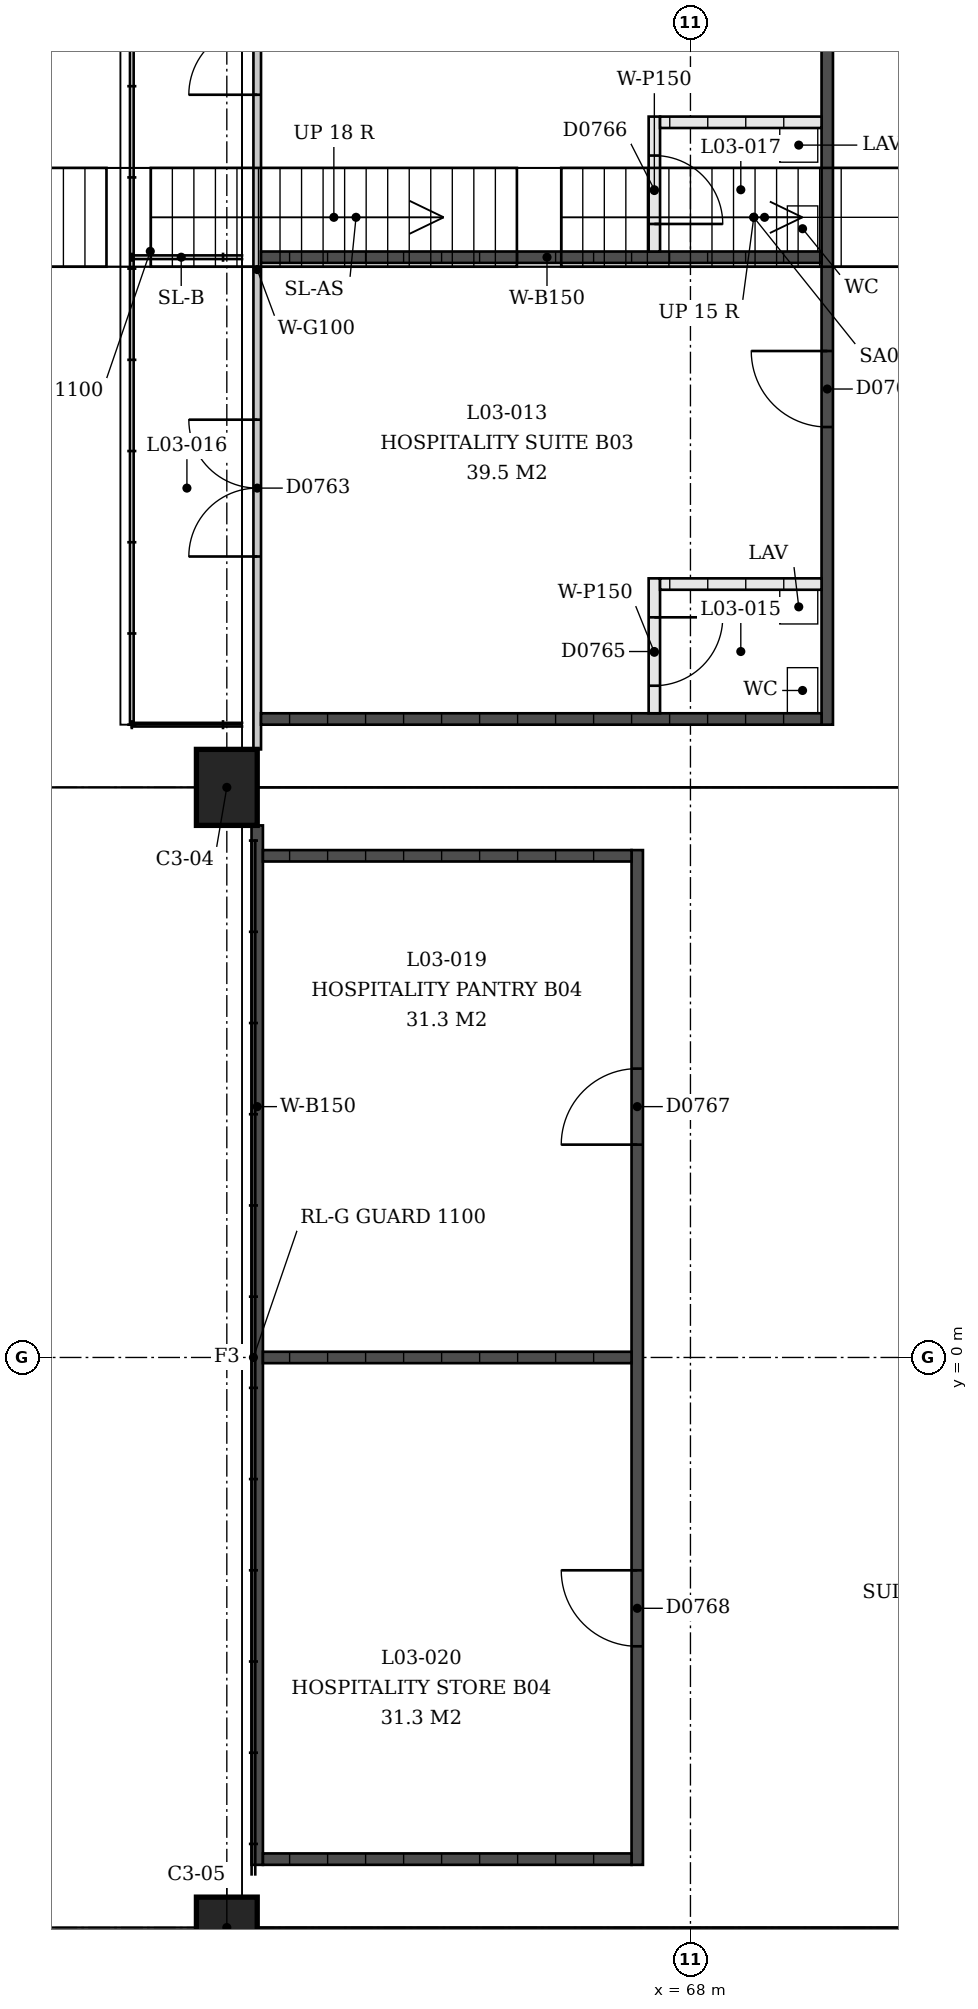
"""IFC4 building model, lengths in metres.
Left out: names, types, materials, properties, quantities, classifications, styles, units other than length and angle.
Written with IfcOpenShell. Run it as: python <this file> out.ifc"""

import sys

from ifc_helpers import new_model, si_unit, direction, frame, frame_2d, origin, origin_2d, place, context, subcontext, project, spatial, rectangle, extrude, element, fill, save


model = new_model("IFC4")
c1 = context("Model", 3, precision=1e-05, world=origin(), true_north=direction((0.0, 1.0)))
c2 = subcontext(c1, "Body", "Model", "MODEL_VIEW")
j1 = project(units=[si_unit("LENGTHUNIT", "METRE"), si_unit("PLANEANGLEUNIT", "RADIAN")], contexts=[c1])
p1 = place(None, origin())
s1 = spatial("IfcSite", under=j1, at=p1, CompositionType="ELEMENT")
p2 = place(p1, origin())
s2 = spatial("IfcBuilding", under=s1, at=p2, CompositionType="ELEMENT")
p3 = place(p2, frame((0.0, 0.0, 13.5)))
s3 = spatial("IfcBuildingStorey", under=s2, at=p3, CompositionType="ELEMENT", Elevation=13.5)
p4 = place(p3, frame((61.9, 7.5, 0.0), z_axis=(0.0, 0.0, 1.0), x_axis=(0.0, 1.0, 0.0)))
e1 = element("IfcColumn", 1, at=p4, inside=s3, PredefinedType="COLUMN", context=c2, shape_type="SweptSolid", body=[
    extrude(rectangle(XDim=1.0, YDim=0.8, at=origin_2d()), origin(), (0.0, 0.0, 1.0), 2.033),
])
p5 = place(p3, frame((61.9, -7.5, 0.0), z_axis=(0.0, 0.0, 1.0), x_axis=(0.0, 1.0, 0.0)))
e2 = element("IfcColumn", 2, at=p5, inside=s3, PredefinedType="COLUMN", context=c2, shape_type="SweptSolid", body=[
    extrude(rectangle(XDim=0.8, YDim=0.8, at=origin_2d()), origin(), (0.0, 0.0, 1.0), 2.033),
])
p6 = place(p3, frame((62.3, 8.0, 0.0), z_axis=(0.0, 0.0, 1.0), x_axis=(0.0, 1.0, 0.0)))
e3 = element("IfcWall", 3, at=p6, inside=s3, PredefinedType="PARTITIONING", context=c2, shape_type="SweptSolid", body=[
    extrude(rectangle(XDim=12.625, YDim=0.1, at=frame_2d((6.312, 0.0))), origin(), (0.0, 0.0, 1.0), 3.0),
])
p7 = place(p6, frame((2.538, 0.0, 0.0)))
e4 = element("IfcOpeningElement", 4, at=p7, cuts=e3, PredefinedType="OPENING", context=c2, shape_type="SweptSolid", body=[
    extrude(rectangle(XDim=1.8, YDim=2.1, at=frame_2d((0.9, 1.05))), frame((0.0, 0.05, 0.0), z_axis=(0.0, -1.0, 0.0), x_axis=(1.0, 0.0, 0.0)), (0.0, 0.0, 1.0), 0.1),
])
p8 = place(p6, frame((8.613, 0.0, 0.0)))
e5 = element("IfcOpeningElement", 5, at=p8, cuts=e3, PredefinedType="OPENING", context=c2, shape_type="SweptSolid", body=[
    extrude(rectangle(XDim=1.8, YDim=2.1, at=frame_2d((0.9, 1.05))), frame((0.0, 0.05, 0.0), z_axis=(0.0, -1.0, 0.0), x_axis=(1.0, 0.0, 0.0)), (0.0, 0.0, 1.0), 0.1),
])
p9 = place(p3, frame((69.8, 8.325, 0.0), z_axis=(0.0, 0.0, 1.0), x_axis=(0.0, 1.0, 0.0)))
e6 = element("IfcWall", 6, at=p9, inside=s3, PredefinedType="SOLIDWALL", context=c2, shape_type="SweptSolid", body=[
    extrude(rectangle(XDim=12.3, YDim=0.15, at=frame_2d((6.15, 0.0))), origin(), (0.0, 0.0, 1.0), 3.0),
])
p10 = place(p9, frame((3.916, 0.0, 0.0)))
e7 = element("IfcOpeningElement", 7, at=p10, cuts=e6, PredefinedType="OPENING", context=c2, shape_type="SweptSolid", body=[
    extrude(rectangle(XDim=1.0, YDim=2.1, at=frame_2d((0.5, 1.05))), frame((0.0, 0.075, 0.0), z_axis=(0.0, -1.0, 0.0), x_axis=(1.0, 0.0, 0.0)), (0.0, 0.0, 1.0), 0.15),
])
p11 = place(p9, frame((9.991, 0.0, 0.0)))
e8 = element("IfcOpeningElement", 8, at=p11, cuts=e6, PredefinedType="OPENING", context=c2, shape_type="SweptSolid", body=[
    extrude(rectangle(XDim=1.0, YDim=2.1, at=frame_2d((0.5, 1.05))), frame((0.0, 0.075, 0.0), z_axis=(0.0, -1.0, 0.0), x_axis=(1.0, 0.0, 0.0)), (0.0, 0.0, 1.0), 0.15),
])
for number, where, z_axis, x_axis in (
    (9, (62.35, 8.4, 0.0), (0.0, 0.0, 1.0), (1.0, 0.0, 0.0)),
    (10, (62.35, 14.475, 0.0), (0.0, 0.0, 1.0), (1.0, 0.0, 0.0)),
):
    element("IfcWall", number, at=place(p3, frame(where, z_axis=z_axis, x_axis=x_axis)), inside=s3, PredefinedType="SOLIDWALL", context=c2, shape_type="SweptSolid", body=[
        extrude(rectangle(XDim=7.375, YDim=0.15, at=frame_2d((3.688, 0.0))), origin(), (0.0, 0.0, 1.0), 3.0),
    ])
p12 = place(p3, frame((67.525, 8.475, 0.0), z_axis=(0.0, 0.0, 1.0), x_axis=(0.0, 1.0, 0.0)))
e11 = element("IfcWall", 11, at=p12, inside=s3, PredefinedType="PARTITIONING", context=c2, shape_type="SweptSolid", body=[
    extrude(rectangle(XDim=1.775, YDim=0.15, at=frame_2d((0.887, 0.0))), origin(), (0.0, 0.0, 1.0), 3.0),
])
p13 = place(p12, frame((0.363, 0.0, 0.0)))
e12 = element("IfcOpeningElement", 12, at=p13, cuts=e11, PredefinedType="OPENING", context=c2, shape_type="SweptSolid", body=[
    extrude(rectangle(XDim=0.9, YDim=2.1, at=frame_2d((0.45, 1.05))), frame((0.0, 0.075, 0.0), z_axis=(0.0, -1.0, 0.0), x_axis=(1.0, 0.0, 0.0)), (0.0, 0.0, 1.0), 0.15),
])
p14 = place(p3, frame((67.6, 10.175, 0.0), z_axis=(0.0, 0.0, 1.0), x_axis=(1.0, 0.0, 0.0)))
e13 = element("IfcWall", 13, at=p14, inside=s3, PredefinedType="PARTITIONING", context=c2, shape_type="SweptSolid", body=[
    extrude(rectangle(XDim=2.125, YDim=0.15, at=frame_2d((1.062, 0.0))), origin(), (0.0, 0.0, 1.0), 3.0),
])
p15 = place(p3, frame((67.525, 14.55, 0.0), z_axis=(0.0, 0.0, 1.0), x_axis=(0.0, 1.0, 0.0)))
e14 = element("IfcWall", 14, at=p15, inside=s3, PredefinedType="PARTITIONING", context=c2, shape_type="SweptSolid", body=[
    extrude(rectangle(XDim=1.775, YDim=0.15, at=frame_2d((0.887, 0.0))), origin(), (0.0, 0.0, 1.0), 3.0),
])
p16 = place(p15, frame((0.363, 0.0, 0.0)))
e15 = element("IfcOpeningElement", 15, at=p16, cuts=e14, PredefinedType="OPENING", context=c2, shape_type="SweptSolid", body=[
    extrude(rectangle(XDim=0.9, YDim=2.1, at=frame_2d((0.45, 1.05))), frame((0.0, 0.075, 0.0), z_axis=(0.0, -1.0, 0.0), x_axis=(1.0, 0.0, 0.0)), (0.0, 0.0, 1.0), 0.15),
])
p17 = place(p3, frame((67.6, 16.25, 0.0), z_axis=(0.0, 0.0, 1.0), x_axis=(1.0, 0.0, 0.0)))
e16 = element("IfcWall", 16, at=p17, inside=s3, PredefinedType="PARTITIONING", context=c2, shape_type="SweptSolid", body=[
    extrude(rectangle(XDim=2.125, YDim=0.15, at=frame_2d((1.062, 0.0))), origin(), (0.0, 0.0, 1.0), 3.0),
])
p18 = place(p3, frame((62.3, 7.0, 0.0), z_axis=(0.0, 0.0, 1.0), x_axis=(0.0, -1.0, 0.0)))
e17 = element("IfcWall", 17, at=p18, inside=s3, PredefinedType="SOLIDWALL", context=c2, shape_type="SweptSolid", body=[
    extrude(rectangle(XDim=13.675, YDim=0.15, at=frame_2d((6.837, 0.0))), origin(), (0.0, 0.0, 1.0), 3.0),
])
p19 = place(p3, frame((67.3, 6.675, 0.0), z_axis=(0.0, 0.0, 1.0), x_axis=(0.0, -1.0, 0.0)))
e18 = element("IfcWall", 18, at=p19, inside=s3, PredefinedType="SOLIDWALL", context=c2, shape_type="SweptSolid", body=[
    extrude(rectangle(XDim=13.35, YDim=0.15, at=frame_2d((6.675, 0.0))), origin(), (0.0, 0.0, 1.0), 3.0),
])
p20 = place(p19, frame((2.875, 0.0, 0.0)))
e19 = element("IfcOpeningElement", 19, at=p20, cuts=e18, PredefinedType="OPENING", context=c2, shape_type="SweptSolid", body=[
    extrude(rectangle(XDim=1.0, YDim=2.1, at=frame_2d((0.5, 1.05))), frame((0.0, 0.075, 0.0), z_axis=(0.0, -1.0, 0.0), x_axis=(1.0, 0.0, 0.0)), (0.0, 0.0, 1.0), 0.15),
])
p21 = place(p19, frame((9.475, 0.0, 0.0)))
e20 = element("IfcOpeningElement", 20, at=p21, cuts=e18, PredefinedType="OPENING", context=c2, shape_type="SweptSolid", body=[
    extrude(rectangle(XDim=1.0, YDim=2.1, at=frame_2d((0.5, 1.05))), frame((0.0, 0.075, 0.0), z_axis=(0.0, -1.0, 0.0), x_axis=(1.0, 0.0, 0.0)), (0.0, 0.0, 1.0), 0.15),
])
for number, where, z_axis, x_axis in (
    (21, (62.375, 6.6, 0.0), (0.0, 0.0, 1.0), (1.0, 0.0, 0.0)),
    (22, (62.375, 0.0, 0.0), (0.0, 0.0, 1.0), (1.0, 0.0, 0.0)),
    (23, (62.375, -6.6, 0.0), (0.0, 0.0, 1.0), (1.0, 0.0, 0.0)),
):
    element("IfcWall", number, at=place(p3, frame(where, z_axis=z_axis, x_axis=x_axis)), inside=s3, PredefinedType="SOLIDWALL", context=c2, shape_type="SweptSolid", body=[
        extrude(rectangle(XDim=4.85, YDim=0.15, at=frame_2d((2.425, 0.0))), origin(), (0.0, 0.0, 1.0), 3.0),
    ])
p22 = place(p10, origin())
e24 = element("IfcDoor", 24, at=p22, inside=s3, OperationType="SINGLE_SWING_LEFT", PredefinedType="DOOR", context=c2, shape_type="SweptSolid", body=[
    extrude(rectangle(XDim=1.0, YDim=2.1, at=frame_2d((0.5, 1.05))), frame((0.0, 0.025, 0.0), z_axis=(0.0, -1.0, 0.0), x_axis=(1.0, 0.0, 0.0)), (0.0, 0.0, 1.0), 0.05),
])
fill(e7, e24)
p23 = place(p7, origin())
e25 = element("IfcDoor", 25, at=p23, inside=s3, OperationType="DOUBLE_DOOR_SINGLE_SWING", PredefinedType="DOOR", context=c2, shape_type="SweptSolid", body=[
    extrude(rectangle(XDim=1.8, YDim=2.1, at=frame_2d((0.9, 1.05))), frame((0.0, 0.025, 0.0), z_axis=(0.0, -1.0, 0.0), x_axis=(1.0, 0.0, 0.0)), (0.0, 0.0, 1.0), 0.05),
])
fill(e4, e25)
p24 = place(p8, origin())
e26 = element("IfcDoor", 26, at=p24, inside=s3, OperationType="DOUBLE_DOOR_SINGLE_SWING", PredefinedType="DOOR", context=c2, shape_type="SweptSolid", body=[
    extrude(rectangle(XDim=1.8, YDim=2.1, at=frame_2d((0.9, 1.05))), frame((0.0, 0.025, 0.0), z_axis=(0.0, -1.0, 0.0), x_axis=(1.0, 0.0, 0.0)), (0.0, 0.0, 1.0), 0.05),
])
fill(e5, e26)
p25 = place(p13, origin())
e27 = element("IfcDoor", 27, at=p25, inside=s3, OperationType="SINGLE_SWING_RIGHT", PredefinedType="DOOR", context=c2, shape_type="SweptSolid", body=[
    extrude(rectangle(XDim=0.9, YDim=2.1, at=frame_2d((0.45, 1.05))), frame((0.0, 0.025, 0.0), z_axis=(0.0, -1.0, 0.0), x_axis=(1.0, 0.0, 0.0)), (0.0, 0.0, 1.0), 0.05),
])
fill(e12, e27)
p26 = place(p16, origin())
e28 = element("IfcDoor", 28, at=p26, inside=s3, OperationType="SINGLE_SWING_LEFT", PredefinedType="DOOR", context=c2, shape_type="SweptSolid", body=[
    extrude(rectangle(XDim=0.9, YDim=2.1, at=frame_2d((0.45, 1.05))), frame((0.0, 0.025, 0.0), z_axis=(0.0, -1.0, 0.0), x_axis=(1.0, 0.0, 0.0)), (0.0, 0.0, 1.0), 0.05),
])
fill(e15, e28)
p27 = place(p20, origin())
e29 = element("IfcDoor", 29, at=p27, inside=s3, OperationType="SINGLE_SWING_RIGHT", PredefinedType="DOOR", context=c2, shape_type="SweptSolid", body=[
    extrude(rectangle(XDim=1.0, YDim=2.1, at=frame_2d((0.5, 1.05))), frame((0.0, 0.025, 0.0), z_axis=(0.0, -1.0, 0.0), x_axis=(1.0, 0.0, 0.0)), (0.0, 0.0, 1.0), 0.05),
])
fill(e19, e29)
p28 = place(p21, origin())
e30 = element("IfcDoor", 30, at=p28, inside=s3, OperationType="SINGLE_SWING_LEFT", PredefinedType="DOOR", context=c2, shape_type="SweptSolid", body=[
    extrude(rectangle(XDim=1.0, YDim=2.1, at=frame_2d((0.5, 1.05))), frame((0.0, 0.025, 0.0), z_axis=(0.0, -1.0, 0.0), x_axis=(1.0, 0.0, 0.0)), (0.0, 0.0, 1.0), 0.05),
])
fill(e20, e30)
save(model, sys.argv[1])
